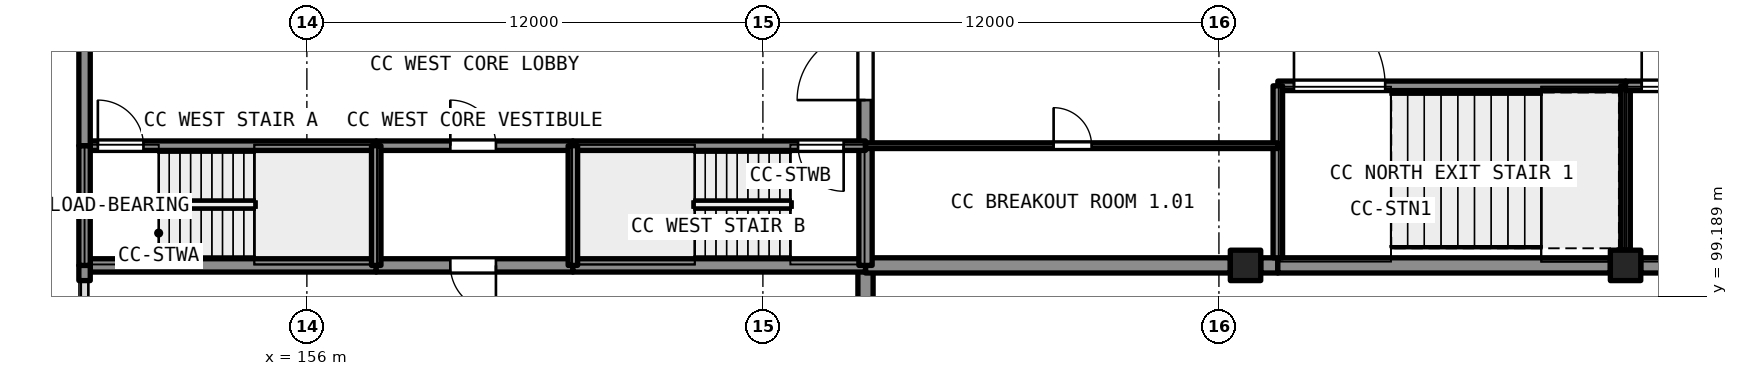
"""IFC4 building model, lengths in metres.
Left out: names, types, materials, properties, quantities, classifications, styles, units other than length and angle.
Written with IfcOpenShell. Run it as: python <this file> out.ifc"""

import sys

from ifc_helpers import new_model, si_unit, direction, frame, frame_2d, origin, origin_2d, place, context, subcontext, project, spatial, rectangle, extrude, element, fill, save


model = new_model("IFC4")
c1 = context("Model", 3, precision=1e-05, world=origin(), true_north=direction((0.0, 1.0)))
c2 = subcontext(c1, "Body", "Model", "MODEL_VIEW")
j1 = project(units=[si_unit("LENGTHUNIT", "METRE"), si_unit("PLANEANGLEUNIT", "RADIAN")], contexts=[c1])
p1 = place(None, origin())
s1 = spatial("IfcSite", under=j1, at=p1, CompositionType="ELEMENT")
p2 = place(p1, origin())
s2 = spatial("IfcBuilding", under=s1, at=p2, CompositionType="ELEMENT")
p3 = place(p2, frame((0.0, 0.0, 9.0)))
s3 = spatial("IfcBuildingStorey", under=s2, at=p3, CompositionType="ELEMENT", Elevation=9.0)
for number, where, z_axis, x_axis in (
    (1, (180.7, 100.0, 0.0), (0.0, 0.0, 1.0), (1.0, 0.0, 0.0)),
    (2, (190.7, 100.0, 0.0), (0.0, 0.0, 1.0), (1.0, 0.0, 0.0)),
):
    element("IfcColumn", number, at=place(p3, frame(where, z_axis=z_axis, x_axis=x_axis)), inside=s3, PredefinedType="COLUMN", context=c2, shape_type="SweptSolid", body=[
        extrude(rectangle(XDim=0.8, YDim=0.8, at=origin_2d()), origin(), (0.0, 0.0, 1.0), 6.0),
    ])
p4 = place(p3, frame((170.7, 60.4, 0.0), z_axis=(0.0, 0.0, 1.0), x_axis=(0.0, 1.0, 0.0)))
e3 = element("IfcWall", 3, at=p4, inside=s3, PredefinedType="SHEAR", context=c2, shape_type="SweptSolid", body=[
    extrude(rectangle(XDim=39.6, YDim=0.4, at=frame_2d((19.8, 0.0))), origin(), (0.0, 0.0, 1.0), 5.59),
])
p5 = place(p3, frame((170.7, 100.0, 0.0), z_axis=(0.0, 0.0, 1.0), x_axis=(1.0, 0.0, 0.0)))
e4 = element("IfcWall", 4, at=p5, inside=s3, PredefinedType="SHEAR", context=c2, shape_type="SweptSolid", body=[
    extrude(rectangle(XDim=9.6, YDim=0.4, at=frame_2d((4.8, 0.0))), origin(), (0.0, 0.0, 1.0), 5.59),
])
p6 = place(p3, frame((181.1, 100.0, 0.0), z_axis=(0.0, 0.0, 1.0), x_axis=(1.0, 0.0, 0.0)))
e5 = element("IfcWall", 5, at=p6, inside=s3, PredefinedType="SHEAR", context=c2, shape_type="SweptSolid", body=[
    extrude(rectangle(XDim=0.45, YDim=0.4, at=frame_2d((0.225, 0.0))), origin(), (0.0, 0.0, 1.0), 5.59),
])
for number, where, z_axis, x_axis in (
    (6, (181.55, 100.0, 0.0), (0.0, 0.0, 1.0), (1.0, 0.0, 0.0)),
    (7, (191.1, 100.0, 0.0), (0.0, 0.0, 1.0), (1.0, 0.0, 0.0)),
):
    element("IfcWall", number, at=place(p3, frame(where, z_axis=z_axis, x_axis=x_axis)), inside=s3, PredefinedType="SHEAR", context=c2, shape_type="SweptSolid", body=[
        extrude(rectangle(XDim=8.75, YDim=0.4, at=frame_2d((4.375, 0.0))), origin(), (0.0, 0.0, 1.0), 5.59),
    ])
p7 = place(p3, frame((150.3, 100.0, 0.0), z_axis=(0.0, 0.0, 1.0), x_axis=(1.0, 0.0, 0.0)))
e8 = element("IfcWall", 8, at=p7, inside=s3, PredefinedType="SHEAR", context=c2, shape_type="SweptSolid", body=[
    extrude(rectangle(XDim=7.525, YDim=0.35, at=frame_2d((3.762, 0.0))), origin(), (0.0, 0.0, 1.0), 5.59),
])
p8 = place(p3, frame((163.0, 100.0, 0.0), z_axis=(0.0, 0.0, 1.0), x_axis=(-1.0, 0.0, 0.0)))
e9 = element("IfcWall", 9, at=p8, inside=s3, PredefinedType="SHEAR", context=c2, shape_type="SweptSolid", body=[
    extrude(rectangle(XDim=5.175, YDim=0.35, at=frame_2d((2.587, 0.0))), origin(), (0.0, 0.0, 1.0), 5.59),
])
p9 = place(p8, frame((2.025, 0.0, 0.0)))
e10 = element("IfcOpeningElement", 10, at=p9, cuts=e9, PredefinedType="OPENING", context=c2, shape_type="SweptSolid", body=[
    extrude(rectangle(XDim=1.2, YDim=2.1, at=frame_2d((0.6, 1.05))), frame((0.0, 0.186, 0.0), z_axis=(0.0, -1.0, 0.0), x_axis=(1.0, 0.0, 0.0)), (0.0, 0.0, 1.0), 0.371),
])
p10 = place(p3, frame((163.0, 100.0, 0.0), z_axis=(0.0, 0.0, 1.0), x_axis=(1.0, 0.0, 0.0)))
e11 = element("IfcWall", 11, at=p10, inside=s3, PredefinedType="SHEAR", context=c2, shape_type="SweptSolid", body=[
    extrude(rectangle(XDim=7.7, YDim=0.35, at=frame_2d((3.85, 0.0))), origin(), (0.0, 0.0, 1.0), 5.59),
])
p11 = place(p3, frame((170.7, 100.0, 0.0), z_axis=(0.0, 0.0, 1.0), x_axis=(0.0, 1.0, 0.0)))
e12 = element("IfcWall", 12, at=p11, inside=s3, PredefinedType="SHEAR", context=c2, shape_type="SweptSolid", body=[
    extrude(rectangle(XDim=3.15, YDim=0.35, at=frame_2d((1.575, 0.0))), origin(), (0.0, 0.0, 1.0), 5.59),
])
p12 = place(p3, frame((170.7, 103.15, 0.0), z_axis=(0.0, 0.0, 1.0), x_axis=(0.0, 1.0, 0.0)))
e13 = element("IfcWall", 13, at=p12, inside=s3, PredefinedType="SHEAR", context=c2, shape_type="SweptSolid", body=[
    extrude(rectangle(XDim=7.25, YDim=0.35, at=frame_2d((3.625, 0.0))), origin(), (0.0, 0.0, 1.0), 5.59),
])
p13 = place(p12, frame((1.2, 0.0, 0.0)))
e14 = element("IfcOpeningElement", 14, at=p13, cuts=e13, PredefinedType="OPENING", context=c2, shape_type="SweptSolid", body=[
    extrude(rectangle(XDim=1.8, YDim=2.1, at=frame_2d((0.9, 1.05))), frame((0.0, 0.186, 0.0), z_axis=(0.0, -1.0, 0.0), x_axis=(1.0, 0.0, 0.0)), (0.0, 0.0, 1.0), 0.371),
])
p14 = place(p3, frame((150.3, 103.15, 0.0), z_axis=(0.0, 0.0, 1.0), x_axis=(1.0, 0.0, 0.0)))
e15 = element("IfcWall", 15, at=p14, inside=s3, PredefinedType="SHEAR", context=c2, shape_type="SweptSolid", body=[
    extrude(rectangle(XDim=7.525, YDim=0.25, at=frame_2d((3.762, 0.0))), origin(), (0.0, 0.0, 1.0), 5.59),
])
p15 = place(p14, frame((0.2, 0.0, 0.0)))
e16 = element("IfcOpeningElement", 16, at=p15, cuts=e15, PredefinedType="OPENING", context=c2, shape_type="SweptSolid", body=[
    extrude(rectangle(XDim=1.2, YDim=2.1, at=frame_2d((0.6, 1.05))), frame((0.0, 0.135, 0.0), z_axis=(0.0, -1.0, 0.0), x_axis=(1.0, 0.0, 0.0)), (0.0, 0.0, 1.0), 0.271),
])
p16 = place(p3, frame((157.825, 103.15, 0.0), z_axis=(0.0, 0.0, 1.0), x_axis=(1.0, 0.0, 0.0)))
e17 = element("IfcWall", 17, at=p16, inside=s3, PredefinedType="SHEAR", context=c2, shape_type="SweptSolid", body=[
    extrude(rectangle(XDim=5.175, YDim=0.25, at=frame_2d((2.587, 0.0))), origin(), (0.0, 0.0, 1.0), 5.59),
])
p17 = place(p16, frame((1.95, 0.0, 0.0)))
e18 = element("IfcOpeningElement", 18, at=p17, cuts=e17, PredefinedType="OPENING", context=c2, shape_type="SweptSolid", body=[
    extrude(rectangle(XDim=1.2, YDim=2.1, at=frame_2d((0.6, 1.05))), frame((0.0, 0.135, 0.0), z_axis=(0.0, -1.0, 0.0), x_axis=(1.0, 0.0, 0.0)), (0.0, 0.0, 1.0), 0.271),
])
p18 = place(p3, frame((163.0, 103.15, 0.0), z_axis=(0.0, 0.0, 1.0), x_axis=(1.0, 0.0, 0.0)))
e19 = element("IfcWall", 19, at=p18, inside=s3, PredefinedType="SHEAR", context=c2, shape_type="SweptSolid", body=[
    extrude(rectangle(XDim=7.7, YDim=0.25, at=frame_2d((3.85, 0.0))), origin(), (0.0, 0.0, 1.0), 5.59),
])
p19 = place(p18, frame((5.925, 0.0, 0.0)))
e20 = element("IfcOpeningElement", 20, at=p19, cuts=e19, PredefinedType="OPENING", context=c2, shape_type="SweptSolid", body=[
    extrude(rectangle(XDim=1.2, YDim=2.1, at=frame_2d((0.6, 1.05))), frame((0.0, 0.135, 0.0), z_axis=(0.0, -1.0, 0.0), x_axis=(1.0, 0.0, 0.0)), (0.0, 0.0, 1.0), 0.271),
])
for number, where, z_axis, x_axis in (
    (21, (157.825, 100.0, 0.0), (0.0, 0.0, 1.0), (0.0, 1.0, 0.0)),
    (22, (163.0, 100.0, 0.0), (0.0, 0.0, 1.0), (0.0, 1.0, 0.0)),
):
    element("IfcWall", number, at=place(p3, frame(where, z_axis=z_axis, x_axis=x_axis)), inside=s3, PredefinedType="SHEAR", context=c2, shape_type="SweptSolid", body=[
        extrude(rectangle(XDim=3.15, YDim=0.25, at=frame_2d((1.575, 0.0))), origin(), (0.0, 0.0, 1.0), 5.59),
    ])
p20 = place(p3, frame((150.15, 99.6, 0.0), z_axis=(0.0, 0.0, 1.0), x_axis=(0.0, 1.0, 0.0)))
e23 = element("IfcWall", 23, at=p20, inside=s3, PredefinedType="SOLIDWALL", context=c2, shape_type="SweptSolid", body=[
    extrude(rectangle(XDim=0.4, YDim=0.3, at=frame_2d((0.2, 0.0))), origin(), (0.0, 0.0, 1.0), 5.59),
])
p21 = place(p3, frame((150.15, 100.0, 0.0), z_axis=(0.0, 0.0, 1.0), x_axis=(0.0, 1.0, 0.0)))
e24 = element("IfcWall", 24, at=p21, inside=s3, PredefinedType="SOLIDWALL", context=c2, shape_type="SweptSolid", body=[
    extrude(rectangle(XDim=3.15, YDim=0.3, at=frame_2d((1.575, 0.0))), origin(), (0.0, 0.0, 1.0), 5.59),
])
p22 = place(p3, frame((150.15, 103.15, 0.0), z_axis=(0.0, 0.0, 1.0), x_axis=(0.0, 1.0, 0.0)))
e25 = element("IfcWall", 25, at=p22, inside=s3, PredefinedType="SOLIDWALL", context=c2, shape_type="SweptSolid", body=[
    extrude(rectangle(XDim=4.225, YDim=0.3, at=frame_2d((2.113, 0.0))), origin(), (0.0, 0.0, 1.0), 5.59),
])
p23 = place(p3, frame((181.55, 104.725, 0.0), z_axis=(0.0, 0.0, 1.0), x_axis=(1.0, 0.0, 0.0)))
e26 = element("IfcWall", 26, at=p23, inside=s3, PredefinedType="SHEAR", context=c2, shape_type="SweptSolid", body=[
    extrude(rectangle(XDim=9.15, YDim=0.25, at=frame_2d((4.575, 0.0))), origin(), (0.0, 0.0, 1.0), 5.59),
])
p24 = place(p23, frame((0.425, 0.0, 0.0)))
e27 = element("IfcOpeningElement", 27, at=p24, cuts=e26, PredefinedType="OPENING", context=c2, shape_type="SweptSolid", body=[
    extrude(rectangle(XDim=2.4, YDim=2.1, at=frame_2d((1.2, 1.05))), frame((0.0, 0.135, 0.0), z_axis=(0.0, -1.0, 0.0), x_axis=(1.0, 0.0, 0.0)), (0.0, 0.0, 1.0), 0.271),
])
p25 = place(p3, frame((181.55, 100.2, 0.0), z_axis=(0.0, 0.0, 1.0), x_axis=(0.0, 1.0, 0.0)))
e28 = element("IfcWall", 28, at=p25, inside=s3, PredefinedType="SHEAR", context=c2, shape_type="SweptSolid", body=[
    extrude(rectangle(XDim=4.525, YDim=0.25, at=frame_2d((2.263, 0.0))), origin(), (0.0, 0.0, 1.0), 5.59),
])
p26 = place(p3, frame((190.7, 100.4, 0.0), z_axis=(0.0, 0.0, 1.0), x_axis=(0.0, 1.0, 0.0)))
e29 = element("IfcWall", 29, at=p26, inside=s3, PredefinedType="SHEAR", context=c2, shape_type="SweptSolid", body=[
    extrude(rectangle(XDim=4.325, YDim=0.25, at=frame_2d((2.163, 0.0))), origin(), (0.0, 0.0, 1.0), 5.59),
])
p27 = place(p3, frame((190.7, 104.725, 0.0), z_axis=(0.0, 0.0, 1.0), x_axis=(1.0, 0.0, 0.0)))
e30 = element("IfcWall", 30, at=p27, inside=s3, PredefinedType="SHEAR", context=c2, shape_type="SweptSolid", body=[
    extrude(rectangle(XDim=9.15, YDim=0.25, at=frame_2d((4.575, 0.0))), origin(), (0.0, 0.0, 1.0), 5.59),
])
p28 = place(p27, frame((0.425, 0.0, 0.0)))
e31 = element("IfcOpeningElement", 31, at=p28, cuts=e30, PredefinedType="OPENING", context=c2, shape_type="SweptSolid", body=[
    extrude(rectangle(XDim=2.4, YDim=2.1, at=frame_2d((1.2, 1.05))), frame((0.0, 0.135, 0.0), z_axis=(0.0, -1.0, 0.0), x_axis=(1.0, 0.0, 0.0)), (0.0, 0.0, 1.0), 0.271),
])
p29 = place(p3, frame((170.7, 103.15, 0.0), z_axis=(0.0, 0.0, 1.0), x_axis=(1.0, 0.0, 0.0)))
e32 = element("IfcWall", 32, at=p29, inside=s3, PredefinedType="PARTITIONING", context=c2, shape_type="SweptSolid", body=[
    extrude(rectangle(XDim=10.85, YDim=0.15, at=frame_2d((5.425, 0.0))), origin(), (0.0, 0.0, 1.0), 5.59),
])
p30 = place(p29, frame((4.95, 0.0, 0.0)))
e33 = element("IfcOpeningElement", 33, at=p30, cuts=e32, PredefinedType="OPENING", context=c2, shape_type="SweptSolid", body=[
    extrude(rectangle(XDim=1.0, YDim=2.1, at=frame_2d((0.5, 1.05))), frame((0.0, 0.085, 0.0), z_axis=(0.0, -1.0, 0.0), x_axis=(1.0, 0.0, 0.0)), (0.0, 0.0, 1.0), 0.171),
])
p31 = place(p9, origin())
e34 = element("IfcDoor", 34, at=p31, inside=s3, OperationType="SINGLE_SWING_LEFT", PredefinedType="DOOR", context=c2, shape_type="SweptSolid", body=[
    extrude(rectangle(XDim=1.2, YDim=2.1, at=frame_2d((0.6, 1.05))), frame((0.0, 0.025, 0.0), z_axis=(0.0, -1.0, 0.0), x_axis=(1.0, 0.0, 0.0)), (0.0, 0.0, 1.0), 0.05),
])
fill(e10, e34)
p32 = place(p13, origin())
e35 = element("IfcDoor", 35, at=p32, inside=s3, OperationType="DOUBLE_DOOR_SINGLE_SWING", PredefinedType="DOOR", context=c2, shape_type="SweptSolid", body=[
    extrude(rectangle(XDim=1.8, YDim=2.1, at=frame_2d((0.9, 1.05))), frame((0.0, 0.025, 0.0), z_axis=(0.0, -1.0, 0.0), x_axis=(1.0, 0.0, 0.0)), (0.0, 0.0, 1.0), 0.05),
])
fill(e14, e35)
p33 = place(p30, origin())
e36 = element("IfcDoor", 36, at=p33, inside=s3, OperationType="SINGLE_SWING_LEFT", PredefinedType="DOOR", context=c2, shape_type="SweptSolid", body=[
    extrude(rectangle(XDim=1.0, YDim=2.1, at=frame_2d((0.5, 1.05))), frame((0.0, 0.025, 0.0), z_axis=(0.0, -1.0, 0.0), x_axis=(1.0, 0.0, 0.0)), (0.0, 0.0, 1.0), 0.05),
])
fill(e33, e36)
p34 = place(p15, origin())
e37 = element("IfcDoor", 37, at=p34, inside=s3, OperationType="SINGLE_SWING_LEFT", PredefinedType="DOOR", context=c2, shape_type="SweptSolid", body=[
    extrude(rectangle(XDim=1.2, YDim=2.1, at=frame_2d((0.6, 1.05))), frame((0.0, 0.025, 0.0), z_axis=(0.0, -1.0, 0.0), x_axis=(1.0, 0.0, 0.0)), (0.0, 0.0, 1.0), 0.05),
])
fill(e16, e37)
p35 = place(p19, origin())
e38 = element("IfcDoor", 38, at=p35, inside=s3, OperationType="SINGLE_SWING_RIGHT", PredefinedType="DOOR", context=c2, shape_type="SweptSolid", body=[
    extrude(rectangle(XDim=1.2, YDim=2.1, at=frame_2d((0.6, 1.05))), frame((0.0, 0.025, 0.0), z_axis=(0.0, -1.0, 0.0), x_axis=(1.0, 0.0, 0.0)), (0.0, 0.0, 1.0), 0.05),
])
fill(e20, e38)
p36 = place(p17, origin())
e39 = element("IfcDoor", 39, at=p36, inside=s3, OperationType="SINGLE_SWING_LEFT", PredefinedType="DOOR", context=c2, shape_type="SweptSolid", body=[
    extrude(rectangle(XDim=1.2, YDim=2.1, at=frame_2d((0.6, 1.05))), frame((0.0, 0.025, 0.0), z_axis=(0.0, -1.0, 0.0), x_axis=(1.0, 0.0, 0.0)), (0.0, 0.0, 1.0), 0.05),
])
fill(e18, e39)
p37 = place(p24, origin())
e40 = element("IfcDoor", 40, at=p37, inside=s3, OperationType="DOUBLE_DOOR_SINGLE_SWING", PredefinedType="DOOR", context=c2, shape_type="SweptSolid", body=[
    extrude(rectangle(XDim=2.4, YDim=2.1, at=frame_2d((1.2, 1.05))), frame((0.0, 0.025, 0.0), z_axis=(0.0, -1.0, 0.0), x_axis=(1.0, 0.0, 0.0)), (0.0, 0.0, 1.0), 0.05),
])
fill(e27, e40)
p38 = place(p28, origin())
e41 = element("IfcDoor", 41, at=p38, inside=s3, OperationType="DOUBLE_DOOR_SINGLE_SWING", PredefinedType="DOOR", context=c2, shape_type="SweptSolid", body=[
    extrude(rectangle(XDim=2.4, YDim=2.1, at=frame_2d((1.2, 1.05))), frame((0.0, 0.025, 0.0), z_axis=(0.0, -1.0, 0.0), x_axis=(1.0, 0.0, 0.0)), (0.0, 0.0, 1.0), 0.05),
])
fill(e31, e41)
save(model, sys.argv[1])
